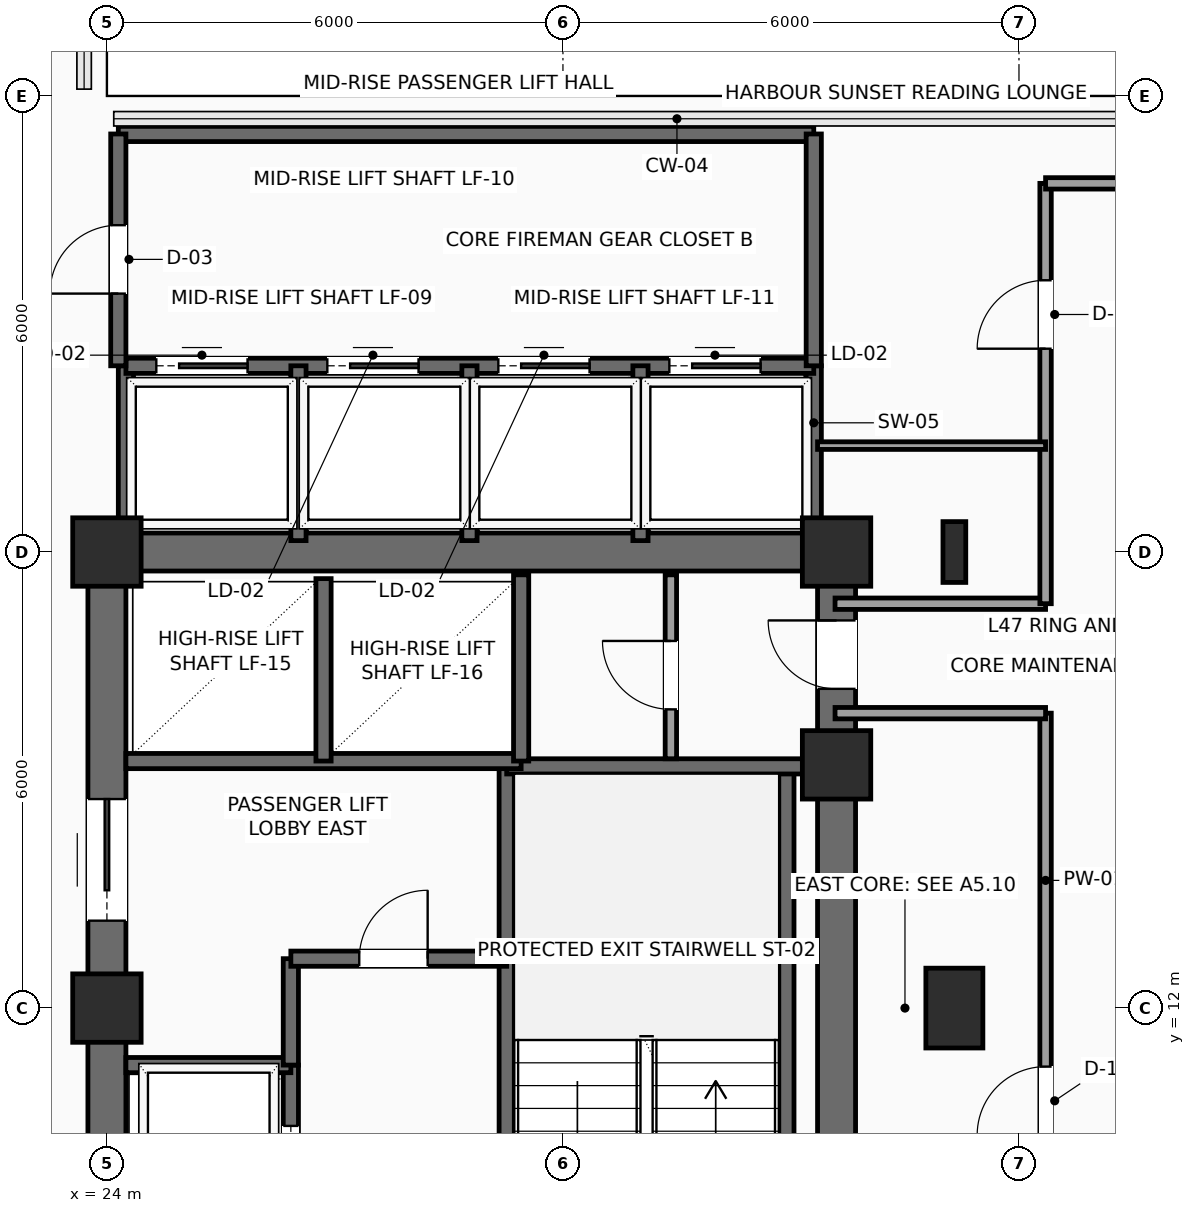
"""IFC4 building model, lengths in metres.
Left out: names, types, materials, properties, quantities, classifications, styles, units other than length and angle.
Written with IfcOpenShell. Run it as: python <this file> out.ifc"""

import sys

from ifc_helpers import new_model, si_unit, direction, frame, frame_2d, origin, origin_2d, place, context, subcontext, project, spatial, rectangle, i_section, extrude, element, fill, save


model = new_model("IFC4")
c1 = context("Model", 3, precision=1e-05, world=origin(), true_north=direction((0.0, 1.0)))
c2 = subcontext(c1, "Body", "Model", "MODEL_VIEW")
j1 = project(units=[si_unit("LENGTHUNIT", "METRE"), si_unit("PLANEANGLEUNIT", "RADIAN")], contexts=[c1])
p1 = place(None, origin())
s1 = spatial("IfcSite", under=j1, at=p1, CompositionType="ELEMENT")
p2 = place(p1, origin())
s2 = spatial("IfcBuilding", under=s1, at=p2, CompositionType="ELEMENT")
p3 = place(p2, frame((0.0, 0.0, 191.7)))
s3 = spatial("IfcBuildingStorey", under=s2, at=p3, CompositionType="ELEMENT", Elevation=191.7)
for number, where, z_axis, x_axis in (
    (1, (24.0, 12.0, 0.0), (0.0, 0.0, 1.0), (1.0, 0.0, 0.0)),
    (2, (24.0, 18.0, 0.0), (0.0, 0.0, 1.0), (1.0, 0.0, 0.0)),
    (3, (33.6, 15.2, 0.0), (0.0, 0.0, 1.0), (1.0, 0.0, 0.0)),
    (4, (33.6, 18.0, 0.0), (0.0, 0.0, 1.0), (1.0, 0.0, 0.0)),
):
    element("IfcColumn", number, at=place(p3, frame(where, z_axis=z_axis, x_axis=x_axis)), inside=s3, PredefinedType="COLUMN", context=c2, shape_type="SweptSolid", body=[
        extrude(rectangle(XDim=0.9, YDim=0.9, at=origin_2d()), origin(), (0.0, 0.0, 1.0), 3.75),
    ])
p4 = place(p3, frame((35.15, 12.0, 0.0), z_axis=(0.0, 0.0, 1.0), x_axis=(1.0, 0.0, 0.0)))
e5 = element("IfcColumn", 5, at=p4, inside=s3, PredefinedType="COLUMN", context=c2, shape_type="SweptSolid", body=[
    extrude(rectangle(XDim=0.75, YDim=1.05, at=origin_2d()), origin(), (0.0, 0.0, 1.0), 3.75),
])
p5 = place(p3, frame((35.15, 18.0, 0.0), z_axis=(0.0, 0.0, 1.0), x_axis=(1.0, 0.0, 0.0)))
e6 = element("IfcColumn", 6, at=p5, inside=s3, PredefinedType="COLUMN", context=c2, shape_type="SweptSolid", body=[
    extrude(i_section(OverallWidth=0.3, OverallDepth=0.8, WebThickness=0.018, FlangeThickness=0.033, FilletRadius=0.03, at=origin_2d()), origin(), (0.0, 0.0, 1.0), 3.75),
])
p6 = place(p3, frame((24.0, 18.0, 0.0), z_axis=(0.0, 0.0, 1.0), x_axis=(1.0, 0.0, 0.0)))
e7 = element("IfcWall", 7, at=p6, inside=s3, PredefinedType="SHEAR", context=c2, shape_type="SweptSolid", body=[
    extrude(rectangle(XDim=9.6, YDim=0.5, at=frame_2d((4.8, 0.0))), origin(), (0.0, 0.0, 1.0), 3.54),
])
p7 = place(p3, frame((24.0, 6.0, 0.0), z_axis=(0.0, 0.0, 1.0), x_axis=(0.0, 1.0, 0.0)))
e8 = element("IfcWall", 8, at=p7, inside=s3, PredefinedType="SHEAR", context=c2, shape_type="SweptSolid", body=[
    extrude(rectangle(XDim=12.0, YDim=0.5, at=frame_2d((6.0, 0.0))), origin(), (0.0, 0.0, 1.0), 3.54),
])
p8 = place(p7, frame((7.15, 0.0, 0.0)))
e9 = element("IfcOpeningElement", 9, at=p8, cuts=e8, PredefinedType="OPENING", context=c2, shape_type="SweptSolid", body=[
    extrude(rectangle(XDim=1.6, YDim=2.3, at=frame_2d((0.8, 1.15))), frame((0.0, 0.26, 0.0), z_axis=(0.0, -1.0, 0.0), x_axis=(1.0, 0.0, 0.0)), (0.0, 0.0, 1.0), 0.52),
])
p9 = place(p3, frame((33.6, 6.0, 0.0), z_axis=(0.0, 0.0, 1.0), x_axis=(0.0, 1.0, 0.0)))
e10 = element("IfcWall", 10, at=p9, inside=s3, PredefinedType="SHEAR", context=c2, shape_type="SweptSolid", body=[
    extrude(rectangle(XDim=12.0, YDim=0.5, at=frame_2d((6.0, 0.0))), origin(), (0.0, 0.0, 1.0), 3.54),
])
p10 = place(p9, frame((10.2, 0.0, 0.0)))
e11 = element("IfcOpeningElement", 11, at=p10, cuts=e10, PredefinedType="OPENING", context=c2, shape_type="SweptSolid", body=[
    extrude(rectangle(XDim=0.9, YDim=2.15, at=frame_2d((0.45, 1.075))), frame((0.0, 0.26, 0.0), z_axis=(0.0, -1.0, 0.0), x_axis=(1.0, 0.0, 0.0)), (0.0, 0.0, 1.0), 0.52),
])
p11 = place(p3, frame((29.26, 6.3, 0.0), z_axis=(0.0, 0.0, 1.0), x_axis=(0.0, 1.0, 0.0)))
e12 = element("IfcWall", 12, at=p11, inside=s3, PredefinedType="SHEAR", context=c2, shape_type="SweptSolid", body=[
    extrude(rectangle(XDim=8.88, YDim=0.2, at=frame_2d((4.44, 0.0))), origin(), (0.0, 0.0, 1.0), 3.54),
])
p12 = place(p11, frame((0.35, 0.0, 0.0)))
e13 = element("IfcOpeningElement", 13, at=p12, cuts=e12, PredefinedType="OPENING", context=c2, shape_type="SweptSolid", body=[
    extrude(rectangle(XDim=1.1, YDim=2.2, at=frame_2d((0.55, 1.1))), frame((0.0, 0.11, 0.0), z_axis=(0.0, -1.0, 0.0), x_axis=(1.0, 0.0, 0.0)), (0.0, 0.0, 1.0), 0.22),
])
p13 = place(p3, frame((32.94, 6.3, 0.0), z_axis=(0.0, 0.0, 1.0), x_axis=(0.0, 1.0, 0.0)))
e14 = element("IfcWall", 14, at=p13, inside=s3, PredefinedType="SHEAR", context=c2, shape_type="SweptSolid", body=[
    extrude(rectangle(XDim=8.88, YDim=0.2, at=frame_2d((4.44, 0.0))), origin(), (0.0, 0.0, 1.0), 3.54),
])
p14 = place(p3, frame((29.26, 15.18, 0.0), z_axis=(0.0, 0.0, 1.0), x_axis=(1.0, 0.0, 0.0)))
e15 = element("IfcWall", 15, at=p14, inside=s3, PredefinedType="SHEAR", context=c2, shape_type="SweptSolid", body=[
    extrude(rectangle(XDim=4.04, YDim=0.2, at=frame_2d((2.02, 0.0))), origin(), (0.0, 0.0, 1.0), 3.54),
])
p15 = place(p3, frame((26.42, 6.3, 0.0), z_axis=(0.0, 0.0, 1.0), x_axis=(0.0, 1.0, 0.0)))
e16 = element("IfcWall", 16, at=p15, inside=s3, PredefinedType="SHEAR", context=c2, shape_type="SweptSolid", body=[
    extrude(rectangle(XDim=4.95, YDim=0.2, at=frame_2d((2.475, 0.0))), origin(), (0.0, 0.0, 1.0), 3.54),
])
p16 = place(p15, frame((0.65, 0.0, 0.0)))
e17 = element("IfcOpeningElement", 17, at=p16, cuts=e16, PredefinedType="OPENING", context=c2, shape_type="SweptSolid", body=[
    extrude(rectangle(XDim=1.1, YDim=2.2, at=frame_2d((0.55, 1.1))), frame((0.0, 0.11, 0.0), z_axis=(0.0, -1.0, 0.0), x_axis=(1.0, 0.0, 0.0)), (0.0, 0.0, 1.0), 0.22),
])
p17 = place(p15, frame((3.05, 0.0, 0.0)))
e18 = element("IfcOpeningElement", 18, at=p17, cuts=e16, PredefinedType="OPENING", context=c2, shape_type="SweptSolid", body=[
    extrude(rectangle(XDim=1.1, YDim=2.2, at=frame_2d((0.55, 1.1))), frame((0.0, 0.11, 0.0), z_axis=(0.0, -1.0, 0.0), x_axis=(1.0, 0.0, 0.0)), (0.0, 0.0, 1.0), 0.22),
])
p18 = place(p3, frame((24.25, 11.25, 0.0), z_axis=(0.0, 0.0, 1.0), x_axis=(1.0, 0.0, 0.0)))
e19 = element("IfcWall", 19, at=p18, inside=s3, PredefinedType="SHEAR", context=c2, shape_type="SweptSolid", body=[
    extrude(rectangle(XDim=2.17, YDim=0.2, at=frame_2d((1.085, 0.0))), origin(), (0.0, 0.0, 1.0), 3.54),
])
p19 = place(p3, frame((26.42, 11.25, 0.0), z_axis=(0.0, 0.0, 1.0), x_axis=(0.0, 1.0, 0.0)))
e20 = element("IfcWall", 20, at=p19, inside=s3, PredefinedType="SHEAR", context=c2, shape_type="SweptSolid", body=[
    extrude(rectangle(XDim=1.4, YDim=0.2, at=frame_2d((0.7, 0.0))), origin(), (0.0, 0.0, 1.0), 3.54),
])
p20 = place(p3, frame((26.42, 12.65, 0.0), z_axis=(0.0, 0.0, 1.0), x_axis=(1.0, 0.0, 0.0)))
e21 = element("IfcWall", 21, at=p20, inside=s3, PredefinedType="SHEAR", context=c2, shape_type="SweptSolid", body=[
    extrude(rectangle(XDim=2.84, YDim=0.2, at=frame_2d((1.42, 0.0))), origin(), (0.0, 0.0, 1.0), 3.54),
])
p21 = place(p20, frame((0.9, 0.0, 0.0)))
e22 = element("IfcOpeningElement", 22, at=p21, cuts=e21, PredefinedType="OPENING", context=c2, shape_type="SweptSolid", body=[
    extrude(rectangle(XDim=0.9, YDim=2.15, at=frame_2d((0.45, 1.075))), frame((0.0, 0.11, 0.0), z_axis=(0.0, -1.0, 0.0), x_axis=(1.0, 0.0, 0.0)), (0.0, 0.0, 1.0), 0.22),
])
p22 = place(p3, frame((24.25, 15.25, 0.0), z_axis=(0.0, 0.0, 1.0), x_axis=(1.0, 0.0, 0.0)))
e23 = element("IfcWall", 23, at=p22, inside=s3, PredefinedType="SHEAR", context=c2, shape_type="SweptSolid", body=[
    extrude(rectangle(XDim=5.2, YDim=0.2, at=frame_2d((2.6, 0.0))), origin(), (0.0, 0.0, 1.0), 3.54),
])
p23 = place(p3, frame((26.85, 15.25, 0.0), z_axis=(0.0, 0.0, 1.0), x_axis=(0.0, 1.0, 0.0)))
e24 = element("IfcWall", 24, at=p23, inside=s3, PredefinedType="SHEAR", context=c2, shape_type="SweptSolid", body=[
    extrude(rectangle(XDim=2.4, YDim=0.2, at=frame_2d((1.2, 0.0))), origin(), (0.0, 0.0, 1.0), 3.54),
])
p24 = place(p3, frame((29.45, 15.25, 0.0), z_axis=(0.0, 0.0, 1.0), x_axis=(0.0, 1.0, 0.0)))
e25 = element("IfcWall", 25, at=p24, inside=s3, PredefinedType="SHEAR", context=c2, shape_type="SweptSolid", body=[
    extrude(rectangle(XDim=2.45, YDim=0.2, at=frame_2d((1.225, 0.0))), origin(), (0.0, 0.0, 1.0), 3.54),
])
p25 = place(p3, frame((31.42, 15.28, 0.0), z_axis=(0.0, 0.0, 1.0), x_axis=(0.0, 1.0, 0.0)))
e26 = element("IfcWall", 26, at=p25, inside=s3, PredefinedType="PARTITIONING", context=c2, shape_type="SweptSolid", body=[
    extrude(rectangle(XDim=2.42, YDim=0.15, at=frame_2d((1.21, 0.0))), origin(), (0.0, 0.0, 1.0), 3.54),
])
p26 = place(p25, frame((0.65, 0.0, 0.0)))
e27 = element("IfcOpeningElement", 27, at=p26, cuts=e26, PredefinedType="OPENING", context=c2, shape_type="SweptSolid", body=[
    extrude(rectangle(XDim=0.9, YDim=2.15, at=frame_2d((0.45, 1.075))), frame((0.0, 0.085, 0.0), z_axis=(0.0, -1.0, 0.0), x_axis=(1.0, 0.0, 0.0)), (0.0, 0.0, 1.0), 0.17),
])
for number, where, z_axis, x_axis in (
    (28, (33.3, 18.1, 0.0), (0.0, 0.0, 1.0), (0.0, 1.0, 0.0)),
    (29, (24.25, 18.1, 0.0), (0.0, 0.0, 1.0), (0.0, 1.0, 0.0)),
):
    element("IfcWall", number, at=place(p3, frame(where, z_axis=z_axis, x_axis=x_axis)), inside=s3, PredefinedType="SHEAR", context=c2, shape_type="SweptSolid", body=[
        extrude(rectangle(XDim=2.35, YDim=0.2, at=frame_2d((1.175, 0.0))), origin(), (0.0, 0.0, 1.0), 3.54),
    ])
p27 = place(p3, frame((24.25, 20.45, 0.0), z_axis=(0.0, 0.0, 1.0), x_axis=(1.0, 0.0, 0.0)))
e30 = element("IfcWall", 30, at=p27, inside=s3, PredefinedType="SHEAR", context=c2, shape_type="SweptSolid", body=[
    extrude(rectangle(XDim=9.05, YDim=0.2, at=frame_2d((4.525, 0.0))), origin(), (0.0, 0.0, 1.0), 3.54),
])
p28 = place(p27, frame((0.4, 0.0, 0.0)))
e31 = element("IfcOpeningElement", 31, at=p28, cuts=e30, PredefinedType="OPENING", context=c2, shape_type="SweptSolid", body=[
    extrude(rectangle(XDim=1.2, YDim=2.2, at=frame_2d((0.6, 1.1))), frame((0.0, 0.11, 0.0), z_axis=(0.0, -1.0, 0.0), x_axis=(1.0, 0.0, 0.0)), (0.0, 0.0, 1.0), 0.22),
])
p29 = place(p27, frame((2.65, 0.0, 0.0)))
e32 = element("IfcOpeningElement", 32, at=p29, cuts=e30, PredefinedType="OPENING", context=c2, shape_type="SweptSolid", body=[
    extrude(rectangle(XDim=1.2, YDim=2.2, at=frame_2d((0.6, 1.1))), frame((0.0, 0.11, 0.0), z_axis=(0.0, -1.0, 0.0), x_axis=(1.0, 0.0, 0.0)), (0.0, 0.0, 1.0), 0.22),
])
p30 = place(p27, frame((4.9, 0.0, 0.0)))
e33 = element("IfcOpeningElement", 33, at=p30, cuts=e30, PredefinedType="OPENING", context=c2, shape_type="SweptSolid", body=[
    extrude(rectangle(XDim=1.2, YDim=2.2, at=frame_2d((0.6, 1.1))), frame((0.0, 0.11, 0.0), z_axis=(0.0, -1.0, 0.0), x_axis=(1.0, 0.0, 0.0)), (0.0, 0.0, 1.0), 0.22),
])
p31 = place(p27, frame((7.15, 0.0, 0.0)))
e34 = element("IfcOpeningElement", 34, at=p31, cuts=e30, PredefinedType="OPENING", context=c2, shape_type="SweptSolid", body=[
    extrude(rectangle(XDim=1.2, YDim=2.2, at=frame_2d((0.6, 1.1))), frame((0.0, 0.11, 0.0), z_axis=(0.0, -1.0, 0.0), x_axis=(1.0, 0.0, 0.0)), (0.0, 0.0, 1.0), 0.22),
])
for number, where, z_axis, x_axis in (
    (35, (26.52, 18.15, 0.0), (0.0, 0.0, 1.0), (0.0, 1.0, 0.0)),
    (36, (28.77, 18.15, 0.0), (0.0, 0.0, 1.0), (0.0, 1.0, 0.0)),
    (37, (31.02, 18.15, 0.0), (0.0, 0.0, 1.0), (0.0, 1.0, 0.0)),
):
    element("IfcWall", number, at=place(p3, frame(where, z_axis=z_axis, x_axis=x_axis)), inside=s3, PredefinedType="SHEAR", context=c2, shape_type="SweptSolid", body=[
        extrude(rectangle(XDim=2.3, YDim=0.2, at=frame_2d((1.15, 0.0))), origin(), (0.0, 0.0, 1.0), 3.54),
    ])
p32 = place(p3, frame((24.15, 23.5, 0.0), z_axis=(0.0, 0.0, 1.0), x_axis=(1.0, 0.0, 0.0)))
e38 = element("IfcWall", 38, at=p32, inside=s3, PredefinedType="SHEAR", context=c2, shape_type="SweptSolid", body=[
    extrude(rectangle(XDim=9.15, YDim=0.2, at=frame_2d((4.575, 0.0))), origin(), (0.0, 0.0, 1.0), 3.54),
])
p33 = place(p3, frame((33.3, 20.45, 0.0), z_axis=(0.0, 0.0, 1.0), x_axis=(0.0, 1.0, 0.0)))
e39 = element("IfcWall", 39, at=p33, inside=s3, PredefinedType="SHEAR", context=c2, shape_type="SweptSolid", body=[
    extrude(rectangle(XDim=3.05, YDim=0.2, at=frame_2d((1.525, 0.0))), origin(), (0.0, 0.0, 1.0), 3.54),
])
p34 = place(p3, frame((24.15, 20.45, 0.0), z_axis=(0.0, 0.0, 1.0), x_axis=(0.0, 1.0, 0.0)))
e40 = element("IfcWall", 40, at=p34, inside=s3, PredefinedType="SHEAR", context=c2, shape_type="SweptSolid", body=[
    extrude(rectangle(XDim=3.05, YDim=0.2, at=frame_2d((1.525, 0.0))), origin(), (0.0, 0.0, 1.0), 3.54),
])
p35 = place(p34, frame((0.95, 0.0, 0.0)))
e41 = element("IfcOpeningElement", 41, at=p35, cuts=e40, PredefinedType="OPENING", context=c2, shape_type="SweptSolid", body=[
    extrude(rectangle(XDim=0.9, YDim=2.15, at=frame_2d((0.45, 1.075))), frame((0.0, 0.11, 0.0), z_axis=(0.0, -1.0, 0.0), x_axis=(1.0, 0.0, 0.0)), (0.0, 0.0, 1.0), 0.22),
])
p36 = place(p3, frame((36.35, 5.8, 0.0), z_axis=(0.0, 0.0, 1.0), x_axis=(0.0, 1.0, 0.0)))
e42 = element("IfcWall", 42, at=p36, inside=s3, PredefinedType="PARTITIONING", context=c2, shape_type="SweptSolid", body=[
    extrude(rectangle(XDim=10.08, YDim=0.15, at=frame_2d((5.04, 0.0))), origin(), (0.0, 0.0, 1.0), 3.54),
])
p37 = place(p36, frame((4.53, 0.0, 0.0)))
e43 = element("IfcOpeningElement", 43, at=p37, cuts=e42, PredefinedType="OPENING", context=c2, shape_type="SweptSolid", body=[
    extrude(rectangle(XDim=0.9, YDim=2.1, at=frame_2d((0.45, 1.05))), frame((0.0, 0.085, 0.0), z_axis=(0.0, -1.0, 0.0), x_axis=(1.0, 0.0, 0.0)), (0.0, 0.0, 1.0), 0.17),
])
for number, where, z_axis, x_axis in (
    (44, (36.35, 15.88, 0.0), (0.0, 0.0, 1.0), (-1.0, 0.0, 0.0)),
    (45, (33.58, 17.32, 0.0), (0.0, 0.0, 1.0), (1.0, 0.0, 0.0)),
):
    element("IfcWall", number, at=place(p3, frame(where, z_axis=z_axis, x_axis=x_axis)), inside=s3, PredefinedType="PARTITIONING", context=c2, shape_type="SweptSolid", body=[
        extrude(rectangle(XDim=2.77, YDim=0.15, at=frame_2d((1.385, 0.0))), origin(), (0.0, 0.0, 1.0), 3.54),
    ])
p38 = place(p3, frame((36.35, 17.32, 0.0), z_axis=(0.0, 0.0, 1.0), x_axis=(0.0, 1.0, 0.0)))
e46 = element("IfcWall", 46, at=p38, inside=s3, PredefinedType="PARTITIONING", context=c2, shape_type="SweptSolid", body=[
    extrude(rectangle(XDim=5.53, YDim=0.15, at=frame_2d((2.765, 0.0))), origin(), (0.0, 0.0, 1.0), 3.54),
])
p39 = place(p38, frame((3.355, 0.0, 0.0)))
e47 = element("IfcOpeningElement", 47, at=p39, cuts=e46, PredefinedType="OPENING", context=c2, shape_type="SweptSolid", body=[
    extrude(rectangle(XDim=0.9, YDim=2.1, at=frame_2d((0.45, 1.05))), frame((0.0, 0.085, 0.0), z_axis=(0.0, -1.0, 0.0), x_axis=(1.0, 0.0, 0.0)), (0.0, 0.0, 1.0), 0.17),
])
p40 = place(p3, frame((36.35, 22.85, 0.0), z_axis=(0.0, 0.0, 1.0), x_axis=(1.0, 0.0, 0.0)))
e48 = element("IfcWall", 48, at=p40, inside=s3, PredefinedType="PARTITIONING", context=c2, shape_type="SweptSolid", body=[
    extrude(rectangle(XDim=2.1, YDim=0.15, at=frame_2d((1.05, 0.0))), origin(), (0.0, 0.0, 1.0), 3.54),
])
p41 = place(p3, frame((33.35, 19.4, 0.0), z_axis=(0.0, 0.0, 1.0), x_axis=(1.0, 0.0, 0.0)))
e49 = element("IfcWall", 49, at=p41, inside=s3, PredefinedType="PARTITIONING", context=c2, shape_type="SweptSolid", body=[
    extrude(rectangle(XDim=3.0, YDim=0.1, at=frame_2d((1.5, 0.0))), origin(), (0.0, 0.0, 1.0), 3.54),
])
p42 = place(p8, origin())
e50 = element("IfcDoor", 50, at=p42, inside=s3, OperationType="DOUBLE_DOOR_SLIDING", PredefinedType="DOOR", context=c2, shape_type="SweptSolid", body=[
    extrude(rectangle(XDim=1.6, YDim=2.3, at=frame_2d((0.8, 1.15))), frame((0.0, 0.025, 0.0), z_axis=(0.0, -1.0, 0.0), x_axis=(1.0, 0.0, 0.0)), (0.0, 0.0, 1.0), 0.05),
])
fill(e9, e50)
p43 = place(p10, origin())
e51 = element("IfcDoor", 51, at=p43, inside=s3, OperationType="SINGLE_SWING_RIGHT", PredefinedType="DOOR", context=c2, shape_type="SweptSolid", body=[
    extrude(rectangle(XDim=0.9, YDim=2.15, at=frame_2d((0.45, 1.075))), frame((0.0, 0.025, 0.0), z_axis=(0.0, -1.0, 0.0), x_axis=(1.0, 0.0, 0.0)), (0.0, 0.0, 1.0), 0.05),
])
fill(e11, e51)
p44 = place(p17, origin())
e52 = element("IfcDoor", 52, at=p44, inside=s3, OperationType="SLIDING_TO_LEFT", PredefinedType="DOOR", context=c2, shape_type="SweptSolid", body=[
    extrude(rectangle(XDim=1.1, YDim=2.2, at=frame_2d((0.55, 1.1))), frame((0.0, 0.025, 0.0), z_axis=(0.0, -1.0, 0.0), x_axis=(1.0, 0.0, 0.0)), (0.0, 0.0, 1.0), 0.05),
])
fill(e18, e52)
p45 = place(p21, origin())
e53 = element("IfcDoor", 53, at=p45, inside=s3, OperationType="SINGLE_SWING_RIGHT", PredefinedType="DOOR", context=c2, shape_type="SweptSolid", body=[
    extrude(rectangle(XDim=0.9, YDim=2.15, at=frame_2d((0.45, 1.075))), frame((0.0, 0.025, 0.0), z_axis=(0.0, -1.0, 0.0), x_axis=(1.0, 0.0, 0.0)), (0.0, 0.0, 1.0), 0.05),
])
fill(e22, e53)
p46 = place(p26, origin())
e54 = element("IfcDoor", 54, at=p46, inside=s3, OperationType="SINGLE_SWING_RIGHT", PredefinedType="DOOR", context=c2, shape_type="SweptSolid", body=[
    extrude(rectangle(XDim=0.9, YDim=2.15, at=frame_2d((0.45, 1.075))), frame((0.0, 0.025, 0.0), z_axis=(0.0, -1.0, 0.0), x_axis=(1.0, 0.0, 0.0)), (0.0, 0.0, 1.0), 0.05),
])
fill(e27, e54)
p47 = place(p28, origin())
e55 = element("IfcDoor", 55, at=p47, inside=s3, OperationType="SLIDING_TO_RIGHT", PredefinedType="DOOR", context=c2, shape_type="SweptSolid", body=[
    extrude(rectangle(XDim=1.2, YDim=2.2, at=frame_2d((0.6, 1.1))), frame((0.0, 0.025, 0.0), z_axis=(0.0, -1.0, 0.0), x_axis=(1.0, 0.0, 0.0)), (0.0, 0.0, 1.0), 0.05),
])
fill(e31, e55)
p48 = place(p29, origin())
e56 = element("IfcDoor", 56, at=p48, inside=s3, OperationType="SLIDING_TO_RIGHT", PredefinedType="DOOR", context=c2, shape_type="SweptSolid", body=[
    extrude(rectangle(XDim=1.2, YDim=2.2, at=frame_2d((0.6, 1.1))), frame((0.0, 0.025, 0.0), z_axis=(0.0, -1.0, 0.0), x_axis=(1.0, 0.0, 0.0)), (0.0, 0.0, 1.0), 0.05),
])
fill(e32, e56)
p49 = place(p30, origin())
e57 = element("IfcDoor", 57, at=p49, inside=s3, OperationType="SLIDING_TO_RIGHT", PredefinedType="DOOR", context=c2, shape_type="SweptSolid", body=[
    extrude(rectangle(XDim=1.2, YDim=2.2, at=frame_2d((0.6, 1.1))), frame((0.0, 0.025, 0.0), z_axis=(0.0, -1.0, 0.0), x_axis=(1.0, 0.0, 0.0)), (0.0, 0.0, 1.0), 0.05),
])
fill(e33, e57)
p50 = place(p31, origin())
e58 = element("IfcDoor", 58, at=p50, inside=s3, OperationType="SLIDING_TO_RIGHT", PredefinedType="DOOR", context=c2, shape_type="SweptSolid", body=[
    extrude(rectangle(XDim=1.2, YDim=2.2, at=frame_2d((0.6, 1.1))), frame((0.0, 0.025, 0.0), z_axis=(0.0, -1.0, 0.0), x_axis=(1.0, 0.0, 0.0)), (0.0, 0.0, 1.0), 0.05),
])
fill(e34, e58)
p51 = place(p35, origin())
e59 = element("IfcDoor", 59, at=p51, inside=s3, OperationType="SINGLE_SWING_LEFT", PredefinedType="DOOR", context=c2, shape_type="SweptSolid", body=[
    extrude(rectangle(XDim=0.9, YDim=2.15, at=frame_2d((0.45, 1.075))), frame((0.0, 0.025, 0.0), z_axis=(0.0, -1.0, 0.0), x_axis=(1.0, 0.0, 0.0)), (0.0, 0.0, 1.0), 0.05),
])
fill(e41, e59)
p52 = place(p37, origin())
e60 = element("IfcDoor", 60, at=p52, inside=s3, OperationType="SINGLE_SWING_LEFT", PredefinedType="DOOR", context=c2, shape_type="SweptSolid", body=[
    extrude(rectangle(XDim=0.9, YDim=2.1, at=frame_2d((0.45, 1.05))), frame((0.0, 0.025, 0.0), z_axis=(0.0, -1.0, 0.0), x_axis=(1.0, 0.0, 0.0)), (0.0, 0.0, 1.0), 0.05),
])
fill(e43, e60)
p53 = place(p39, origin())
e61 = element("IfcDoor", 61, at=p53, inside=s3, OperationType="SINGLE_SWING_LEFT", PredefinedType="DOOR", context=c2, shape_type="SweptSolid", body=[
    extrude(rectangle(XDim=0.9, YDim=2.1, at=frame_2d((0.45, 1.05))), frame((0.0, 0.025, 0.0), z_axis=(0.0, -1.0, 0.0), x_axis=(1.0, 0.0, 0.0)), (0.0, 0.0, 1.0), 0.05),
])
fill(e47, e61)
save(model, sys.argv[1])
